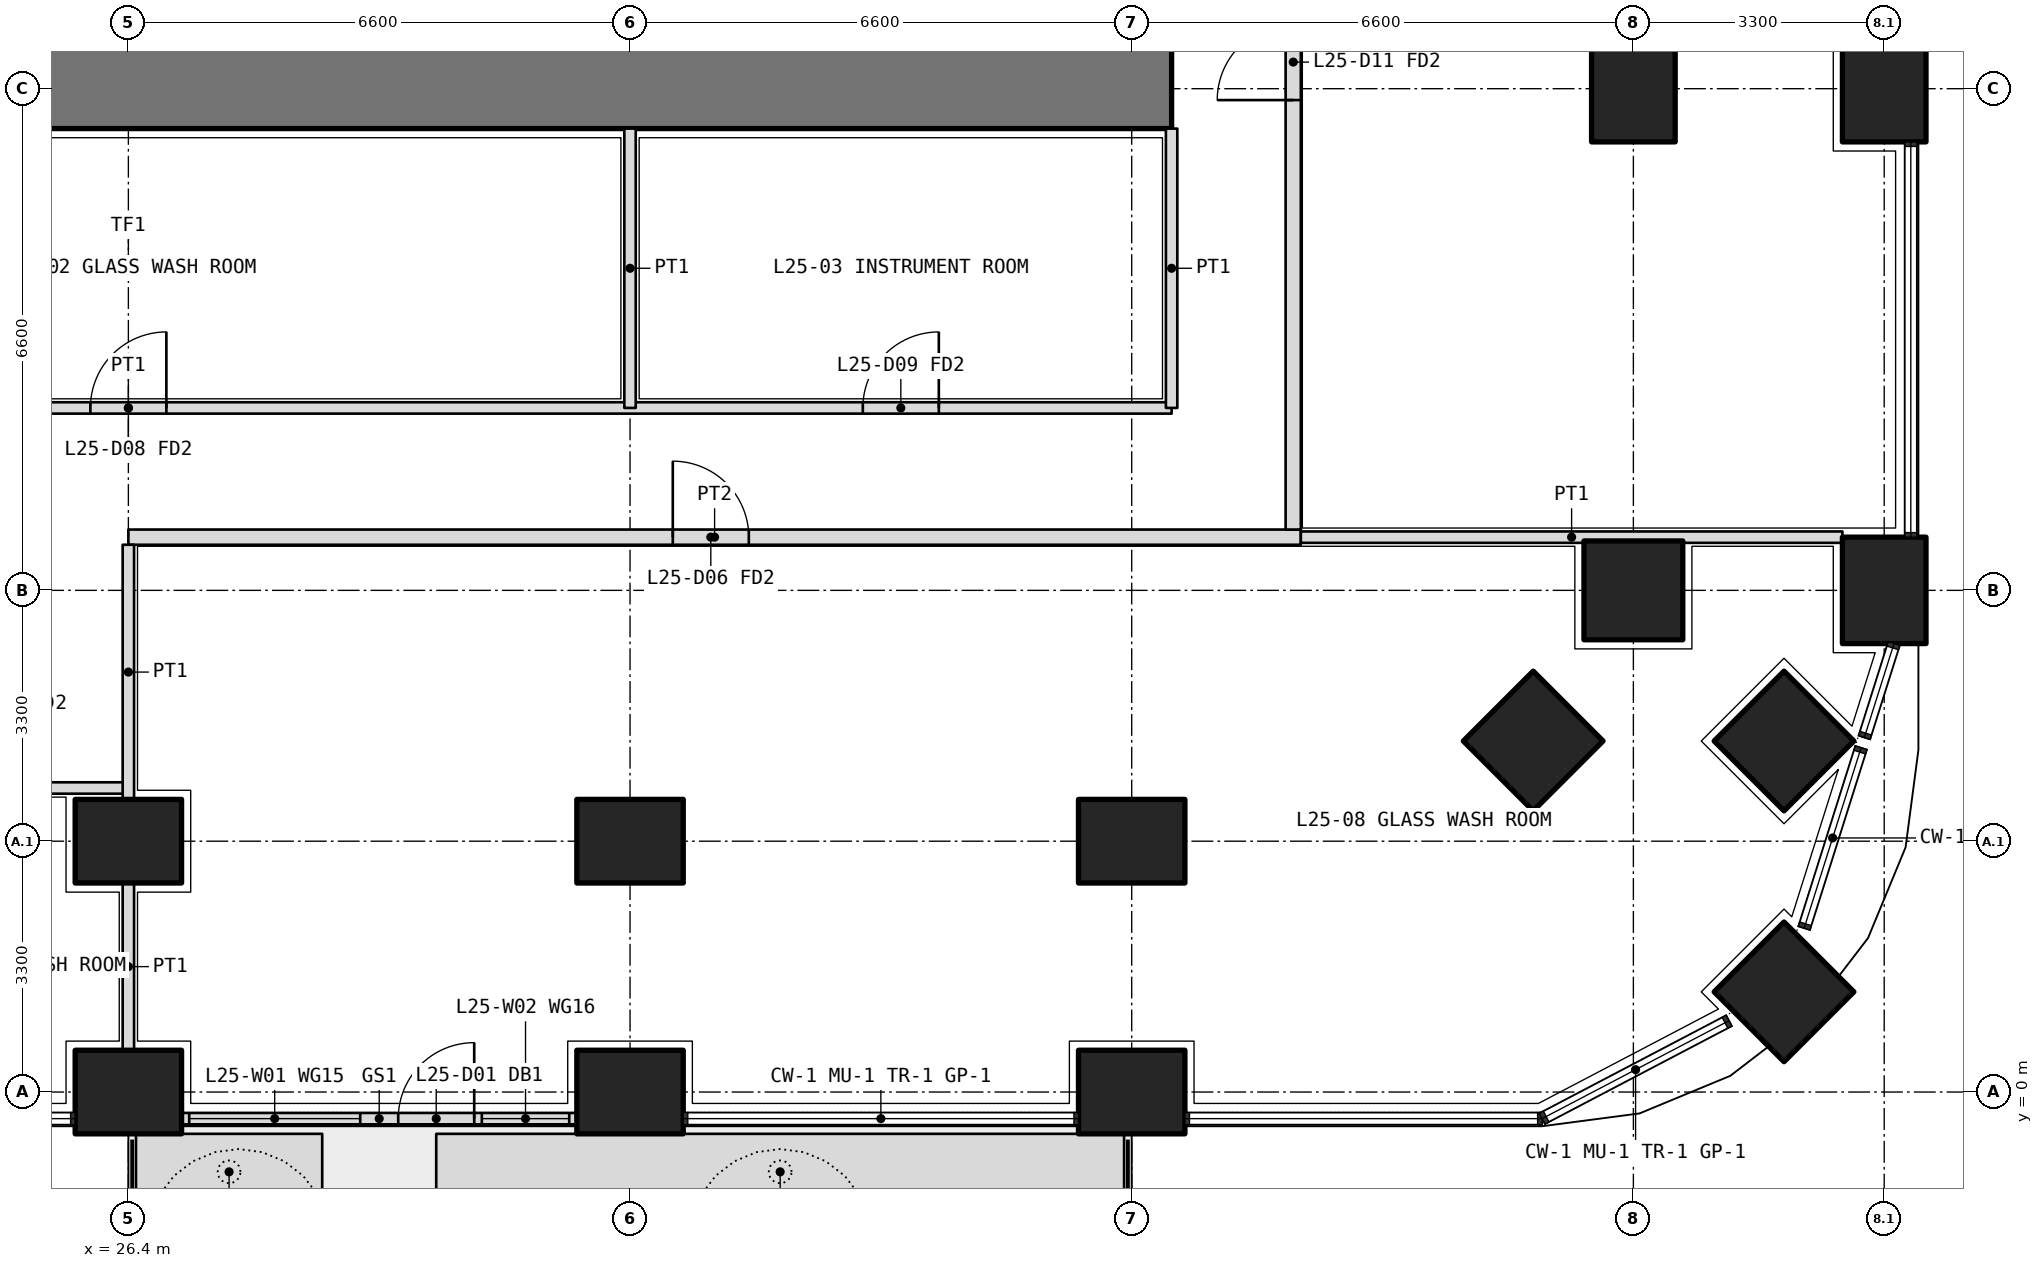
"""IFC4 building model, lengths in metres.
Left out: names, types, materials, properties, quantities, classifications, styles, units other than length and angle.
Written with IfcOpenShell. Run it as: python <this file> out.ifc"""

import sys

from ifc_helpers import new_model, si_unit, direction, frame, frame_2d, origin, origin_2d, place, context, subcontext, project, spatial, polyline, rectangle, outline, extrude, element, fill, save


model = new_model("IFC4")
c1 = context("Model", 3, precision=1e-05, world=origin(), true_north=direction((0.0, 1.0)))
c2 = subcontext(c1, "Body", "Model", "MODEL_VIEW")
j1 = project(units=[si_unit("LENGTHUNIT", "METRE"), si_unit("PLANEANGLEUNIT", "RADIAN")], contexts=[c1])
p1 = place(None, origin())
s1 = spatial("IfcSite", under=j1, at=p1, CompositionType="ELEMENT")
p2 = place(p1, origin())
s2 = spatial("IfcBuilding", under=s1, at=p2, CompositionType="ELEMENT")
p3 = place(p2, frame((0.0, 0.0, 111.6)))
s3 = spatial("IfcBuildingStorey", under=s2, at=p3, CompositionType="ELEMENT", Elevation=111.6)
p4 = place(p3, frame((48.182, 1.318, 0.0), z_axis=(0.0, 0.0, 1.0), x_axis=(0.707106781187, 0.707106781187, 0.0)))
e1 = element("IfcColumn", 1, at=p4, inside=s3, PredefinedType="COLUMN", context=c2, shape_type="SweptSolid", body=[
    extrude(rectangle(XDim=1.3, YDim=1.3, at=origin_2d()), origin(), (0.0, 0.0, 1.0), 4.2),
])
for number, where, z_axis, x_axis in (
    (2, (26.4, 0.0, 0.0), (0.0, 0.0, 1.0), (1.0, 0.0, 0.0)),
    (3, (33.0, 0.0, 0.0), (0.0, 0.0, 1.0), (1.0, 0.0, 0.0)),
    (4, (39.6, 0.0, 0.0), (0.0, 0.0, 1.0), (1.0, 0.0, 0.0)),
    (5, (49.5, 6.6, 0.0), (0.0, 0.0, 1.0), (0.0, 1.0, 0.0)),
    (6, (49.5, 13.2, 0.0), (0.0, 0.0, 1.0), (0.0, 1.0, 0.0)),
):
    element("IfcColumn", number, at=place(p3, frame(where, z_axis=z_axis, x_axis=x_axis)), inside=s3, PredefinedType="COLUMN", context=c2, shape_type="SweptSolid", body=[
        extrude(rectangle(XDim=1.4, YDim=1.1, at=origin_2d()), origin(), (0.0, 0.0, 1.0), 4.2),
    ])
for number, where, z_axis, x_axis in (
    (7, (46.2, 6.6, 0.0), (0.0, 0.0, 1.0), (1.0, 0.0, 0.0)),
    (8, (48.182, 4.618, 0.0), (0.0, 0.0, 1.0), (0.707, 0.707, 0.0)),
):
    element("IfcColumn", number, at=place(p3, frame(where, z_axis=z_axis, x_axis=x_axis)), inside=s3, PredefinedType="COLUMN", context=c2, shape_type="SweptSolid", body=[
        extrude(rectangle(XDim=1.3, YDim=1.3, at=origin_2d()), origin(), (0.0, 0.0, 1.0), 4.2),
    ])
for number, where, z_axis, x_axis in (
    (9, (26.4, 3.3, 0.0), (0.0, 0.0, 1.0), (1.0, 0.0, 0.0)),
    (10, (33.0, 3.3, 0.0), (0.0, 0.0, 1.0), (1.0, 0.0, 0.0)),
    (11, (39.6, 3.3, 0.0), (0.0, 0.0, 1.0), (1.0, 0.0, 0.0)),
):
    element("IfcColumn", number, at=place(p3, frame(where, z_axis=z_axis, x_axis=x_axis)), inside=s3, PredefinedType="COLUMN", context=c2, shape_type="SweptSolid", body=[
        extrude(rectangle(XDim=1.4, YDim=1.1, at=origin_2d()), origin(), (0.0, 0.0, 1.0), 4.2),
    ])
p5 = place(p3, frame((44.882, 4.618, 0.0), z_axis=(0.0, 0.0, 1.0), x_axis=(0.707106781187, 0.707106781187, 0.0)))
e12 = element("IfcColumn", 12, at=p5, inside=s3, PredefinedType="COLUMN", context=c2, shape_type="SweptSolid", body=[
    extrude(rectangle(XDim=1.3, YDim=1.3, at=origin_2d()), origin(), (0.0, 0.0, 1.0), 4.2),
])
p6 = place(p3, frame((46.2, 13.2, 0.0), z_axis=(0.0, 0.0, 1.0), x_axis=(0.0, 1.0, 0.0)))
e13 = element("IfcColumn", 13, at=p6, inside=s3, PredefinedType="COLUMN", context=c2, shape_type="SweptSolid", body=[
    extrude(rectangle(XDim=1.4, YDim=1.1, at=origin_2d()), origin(), (0.0, 0.0, 1.0), 4.2),
])
p7 = place(p3, origin())
e14 = element("IfcWall", 14, at=p7, inside=s3, PredefinedType="USERDEFINED", context=c2, shape_type="SweptSolid", body=[
    extrude(outline(polyline([(26.5, -1.55), (28.95, -1.55), (28.95, -0.55), (26.5, -0.55), (26.5, -1.55)]), holes=[polyline([(26.65, -1.4), (28.8, -1.4), (28.8, -0.7), (26.65, -0.7), (26.65, -1.4)])]), origin(), (0.0, 0.0, 1.0), 1.05),
])
p8 = place(p3, origin())
e15 = element("IfcWall", 15, at=p8, inside=s3, PredefinedType="USERDEFINED", context=c2, shape_type="SweptSolid", body=[
    extrude(outline(polyline([(30.45, -1.55), (39.5, -1.55), (39.5, -0.55), (30.45, -0.55), (30.45, -1.55)]), holes=[polyline([(30.6, -1.4), (39.35, -1.4), (39.35, -0.7), (30.6, -0.7), (30.6, -1.4)])]), origin(), (0.0, 0.0, 1.0), 1.05),
])
p9 = place(p3, frame((27.1, -0.35, 0.0), z_axis=(0.0, 0.0, 1.0), x_axis=(1.0, 0.0, 0.0)))
e16 = element("IfcWall", 16, at=p9, inside=s3, PredefinedType="SOLIDWALL", context=c2, shape_type="SweptSolid", body=[
    extrude(rectangle(XDim=5.2, YDim=0.15, at=frame_2d((2.6, 0.0))), origin(), (0.0, 0.0, 1.0), 2.7),
])
p10 = place(p9, frame((2.85, 0.0, 0.0)))
e17 = element("IfcOpeningElement", 17, at=p10, cuts=e16, PredefinedType="OPENING", context=c2, shape_type="SweptSolid", body=[
    extrude(rectangle(XDim=1.0, YDim=2.4, at=frame_2d((0.5, 1.2))), frame((0.0, 0.085, 0.0), z_axis=(0.0, -1.0, 0.0), x_axis=(1.0, 0.0, 0.0)), (0.0, 0.0, 1.0), 0.17),
])
p11 = place(p9, frame((0.1, 0.0, 0.1)))
e18 = element("IfcOpeningElement", 18, at=p11, cuts=e16, PredefinedType="OPENING", context=c2, shape_type="SweptSolid", body=[
    extrude(rectangle(XDim=2.25, YDim=2.3, at=frame_2d((1.125, 1.15))), frame((0.0, 0.085, 0.0), z_axis=(0.0, -1.0, 0.0), x_axis=(1.0, 0.0, 0.0)), (0.0, 0.0, 1.0), 0.17),
])
p12 = place(p9, frame((3.95, 0.0, 0.1)))
e19 = element("IfcOpeningElement", 19, at=p12, cuts=e16, PredefinedType="OPENING", context=c2, shape_type="SweptSolid", body=[
    extrude(rectangle(XDim=1.15, YDim=2.3, at=frame_2d((0.575, 1.15))), frame((0.0, 0.085, 0.0), z_axis=(0.0, -1.0, 0.0), x_axis=(1.0, 0.0, 0.0)), (0.0, 0.0, 1.0), 0.17),
])
p13 = place(p3, frame((12.675, 13.2, 0.0), z_axis=(0.0, 0.0, 1.0), x_axis=(1.0, 0.0, 0.0)))
e20 = element("IfcWall", 20, at=p13, inside=s3, PredefinedType="SHEAR", context=c2, shape_type="SweptSolid", body=[
    extrude(rectangle(XDim=27.45, YDim=1.05, at=frame_2d((13.725, 0.0))), origin(), (0.0, 0.0, 1.0), 4.2),
])
p14 = place(p3, frame((12.675, 9.0, 0.0), z_axis=(0.0, 0.0, 1.0), x_axis=(1.0, 0.0, 0.0)))
e21 = element("IfcWall", 21, at=p14, inside=s3, PredefinedType="PARTITIONING", context=c2, shape_type="SweptSolid", body=[
    extrude(rectangle(XDim=27.45, YDim=0.15, at=frame_2d((13.725, 0.0))), origin(), (0.0, 0.0, 1.0), 2.85),
])
p15 = place(p14, frame((3.062, 0.0, 0.0)))
e22 = element("IfcOpeningElement", 22, at=p15, cuts=e21, PredefinedType="OPENING", context=c2, shape_type="SweptSolid", body=[
    extrude(rectangle(XDim=1.0, YDim=2.1, at=frame_2d((0.5, 1.05))), frame((0.0, 0.085, 0.0), z_axis=(0.0, -1.0, 0.0), x_axis=(1.0, 0.0, 0.0)), (0.0, 0.0, 1.0), 0.17),
])
p16 = place(p14, frame((13.225, 0.0, 0.0)))
e23 = element("IfcOpeningElement", 23, at=p16, cuts=e21, PredefinedType="OPENING", context=c2, shape_type="SweptSolid", body=[
    extrude(rectangle(XDim=1.0, YDim=2.1, at=frame_2d((0.5, 1.05))), frame((0.0, 0.085, 0.0), z_axis=(0.0, -1.0, 0.0), x_axis=(1.0, 0.0, 0.0)), (0.0, 0.0, 1.0), 0.17),
])
p17 = place(p14, frame((23.387, 0.0, 0.0)))
e24 = element("IfcOpeningElement", 24, at=p17, cuts=e21, PredefinedType="OPENING", context=c2, shape_type="SweptSolid", body=[
    extrude(rectangle(XDim=1.0, YDim=2.1, at=frame_2d((0.5, 1.05))), frame((0.0, 0.085, 0.0), z_axis=(0.0, -1.0, 0.0), x_axis=(1.0, 0.0, 0.0)), (0.0, 0.0, 1.0), 0.17),
])
for number, where, z_axis, x_axis in (
    (25, (40.125, 12.675, 0.0), (0.0, 0.0, 1.0), (0.0, -1.0, 0.0)),
    (26, (33.0, 12.675, 0.0), (0.0, 0.0, 1.0), (0.0, -1.0, 0.0)),
):
    element("IfcWall", number, at=place(p3, frame(where, z_axis=z_axis, x_axis=x_axis)), inside=s3, PredefinedType="PARTITIONING", context=c2, shape_type="SweptSolid", body=[
        extrude(rectangle(XDim=3.675, YDim=0.15, at=frame_2d((1.837, 0.0))), origin(), (0.0, 0.0, 1.0), 2.85),
    ])
p18 = place(p3, frame((26.4, 7.3, 0.0), z_axis=(0.0, 0.0, 1.0), x_axis=(1.0, 0.0, 0.0)))
e27 = element("IfcWall", 27, at=p18, inside=s3, PredefinedType="PARTITIONING", context=c2, shape_type="SweptSolid", body=[
    extrude(rectangle(XDim=15.425, YDim=0.2, at=frame_2d((7.712, 0.0))), origin(), (0.0, 0.0, 1.0), 2.85),
])
p19 = place(p18, frame((7.163, 0.0, 0.0)))
e28 = element("IfcOpeningElement", 28, at=p19, cuts=e27, PredefinedType="OPENING", context=c2, shape_type="SweptSolid", body=[
    extrude(rectangle(XDim=1.0, YDim=2.1, at=frame_2d((0.5, 1.05))), frame((0.0, 0.11, 0.0), z_axis=(0.0, -1.0, 0.0), x_axis=(1.0, 0.0, 0.0)), (0.0, 0.0, 1.0), 0.22),
])
p20 = place(p3, frame((41.725, 7.4, 0.0), z_axis=(0.0, 0.0, 1.0), x_axis=(0.0, 1.0, 0.0)))
e29 = element("IfcWall", 29, at=p20, inside=s3, PredefinedType="PARTITIONING", context=c2, shape_type="SweptSolid", body=[
    extrude(rectangle(XDim=27.625, YDim=0.2, at=frame_2d((13.812, 0.0))), origin(), (0.0, 0.0, 1.0), 2.85),
])
p21 = place(p20, frame((5.65, 0.0, 0.0)))
e30 = element("IfcOpeningElement", 30, at=p21, cuts=e29, PredefinedType="OPENING", context=c2, shape_type="SweptSolid", body=[
    extrude(rectangle(XDim=1.0, YDim=2.1, at=frame_2d((0.5, 1.05))), frame((0.0, 0.11, 0.0), z_axis=(0.0, -1.0, 0.0), x_axis=(1.0, 0.0, 0.0)), (0.0, 0.0, 1.0), 0.22),
])
p22 = place(p20, frame((13.5, 0.0, 0.0)))
e31 = element("IfcOpeningElement", 31, at=p22, cuts=e29, PredefinedType="OPENING", context=c2, shape_type="SweptSolid", body=[
    extrude(rectangle(XDim=1.0, YDim=2.1, at=frame_2d((0.5, 1.05))), frame((0.0, 0.11, 0.0), z_axis=(0.0, -1.0, 0.0), x_axis=(1.0, 0.0, 0.0)), (0.0, 0.0, 1.0), 0.22),
])
p23 = place(p20, frame((16.85, 0.0, 0.0)))
e32 = element("IfcOpeningElement", 32, at=p23, cuts=e29, PredefinedType="OPENING", context=c2, shape_type="SweptSolid", body=[
    extrude(rectangle(XDim=0.9, YDim=2.1, at=frame_2d((0.45, 1.05))), frame((0.0, 0.11, 0.0), z_axis=(0.0, -1.0, 0.0), x_axis=(1.0, 0.0, 0.0)), (0.0, 0.0, 1.0), 0.22),
])
p24 = place(p20, frame((21.8, 0.0, 0.0)))
e33 = element("IfcOpeningElement", 33, at=p24, cuts=e29, PredefinedType="OPENING", context=c2, shape_type="SweptSolid", body=[
    extrude(rectangle(XDim=1.0, YDim=2.1, at=frame_2d((0.5, 1.05))), frame((0.0, 0.11, 0.0), z_axis=(0.0, -1.0, 0.0), x_axis=(1.0, 0.0, 0.0)), (0.0, 0.0, 1.0), 0.22),
])
p25 = place(p20, frame((26.163, 0.0, 0.0)))
e34 = element("IfcOpeningElement", 34, at=p25, cuts=e29, PredefinedType="OPENING", context=c2, shape_type="SweptSolid", body=[
    extrude(rectangle(XDim=1.0, YDim=2.1, at=frame_2d((0.5, 1.05))), frame((0.0, 0.11, 0.0), z_axis=(0.0, -1.0, 0.0), x_axis=(1.0, 0.0, 0.0)), (0.0, 0.0, 1.0), 0.22),
])
p26 = place(p3, frame((48.95, 7.3, 0.0), z_axis=(0.0, 0.0, 1.0), x_axis=(-1.0, 0.0, 0.0)))
e35 = element("IfcWall", 35, at=p26, inside=s3, PredefinedType="PARTITIONING", context=c2, shape_type="SweptSolid", body=[
    extrude(rectangle(XDim=7.125, YDim=0.15, at=frame_2d((3.562, 0.0))), origin(), (0.0, 0.0, 1.0), 2.85),
])
p27 = place(p3, frame((23.1, 4.0, 0.0), z_axis=(0.0, 0.0, 1.0), x_axis=(1.0, 0.0, 0.0)))
e36 = element("IfcWall", 36, at=p27, inside=s3, PredefinedType="PARTITIONING", context=c2, shape_type="SweptSolid", body=[
    extrude(rectangle(XDim=3.3, YDim=0.15, at=frame_2d((1.65, 0.0))), origin(), (0.0, 0.0, 1.0), 2.85),
])
p28 = place(p27, frame((1.15, 0.0, 0.0)))
e37 = element("IfcOpeningElement", 37, at=p28, cuts=e36, PredefinedType="OPENING", context=c2, shape_type="SweptSolid", body=[
    extrude(rectangle(XDim=1.0, YDim=2.1, at=frame_2d((0.5, 1.05))), frame((0.0, 0.085, 0.0), z_axis=(0.0, -1.0, 0.0), x_axis=(1.0, 0.0, 0.0)), (0.0, 0.0, 1.0), 0.17),
])
p29 = place(p3, frame((26.4, 0.55, 0.0), z_axis=(0.0, 0.0, 1.0), x_axis=(0.0, 1.0, 0.0)))
e38 = element("IfcWall", 38, at=p29, inside=s3, PredefinedType="PARTITIONING", context=c2, shape_type="SweptSolid", body=[
    extrude(rectangle(XDim=2.2, YDim=0.15, at=frame_2d((1.1, 0.0))), origin(), (0.0, 0.0, 1.0), 2.85),
])
p30 = place(p3, frame((26.4, 3.85, 0.0), z_axis=(0.0, 0.0, 1.0), x_axis=(0.0, 1.0, 0.0)))
e39 = element("IfcWall", 39, at=p30, inside=s3, PredefinedType="PARTITIONING", context=c2, shape_type="SweptSolid", body=[
    extrude(rectangle(XDim=3.35, YDim=0.15, at=frame_2d((1.675, 0.0))), origin(), (0.0, 0.0, 1.0), 2.85),
])
p31 = place(p10, origin())
e40 = element("IfcDoor", 40, at=p31, inside=s3, OperationType="SINGLE_SWING_RIGHT", PredefinedType="DOOR", context=c2, shape_type="SweptSolid", body=[
    extrude(rectangle(XDim=1.0, YDim=2.4, at=frame_2d((0.5, 1.2))), frame((0.0, 0.025, 0.0), z_axis=(0.0, -1.0, 0.0), x_axis=(1.0, 0.0, 0.0)), (0.0, 0.0, 1.0), 0.05),
])
fill(e17, e40)
p32 = place(p11, origin())
e41 = element("IfcWindow", 41, at=p32, inside=s3, PartitioningType="SINGLE_PANEL", PredefinedType="WINDOW", context=c2, shape_type="SweptSolid", body=[
    extrude(rectangle(XDim=2.25, YDim=2.3, at=frame_2d((1.125, 1.15))), frame((0.0, 0.03, 0.0), z_axis=(0.0, -1.0, 0.0), x_axis=(1.0, 0.0, 0.0)), (0.0, 0.0, 1.0), 0.06),
])
fill(e18, e41)
p33 = place(p12, origin())
e42 = element("IfcWindow", 42, at=p33, inside=s3, PartitioningType="SINGLE_PANEL", PredefinedType="WINDOW", context=c2, shape_type="SweptSolid", body=[
    extrude(rectangle(XDim=1.15, YDim=2.3, at=frame_2d((0.575, 1.15))), frame((0.0, 0.03, 0.0), z_axis=(0.0, -1.0, 0.0), x_axis=(1.0, 0.0, 0.0)), (0.0, 0.0, 1.0), 0.06),
])
fill(e19, e42)
p34 = place(p16, origin())
e43 = element("IfcDoor", 43, at=p34, inside=s3, OperationType="SINGLE_SWING_RIGHT", PredefinedType="DOOR", context=c2, shape_type="SweptSolid", body=[
    extrude(rectangle(XDim=1.0, YDim=2.1, at=frame_2d((0.5, 1.05))), frame((0.0, 0.025, 0.0), z_axis=(0.0, -1.0, 0.0), x_axis=(1.0, 0.0, 0.0)), (0.0, 0.0, 1.0), 0.05),
])
fill(e23, e43)
p35 = place(p17, origin())
e44 = element("IfcDoor", 44, at=p35, inside=s3, OperationType="SINGLE_SWING_RIGHT", PredefinedType="DOOR", context=c2, shape_type="SweptSolid", body=[
    extrude(rectangle(XDim=1.0, YDim=2.1, at=frame_2d((0.5, 1.05))), frame((0.0, 0.025, 0.0), z_axis=(0.0, -1.0, 0.0), x_axis=(1.0, 0.0, 0.0)), (0.0, 0.0, 1.0), 0.05),
])
fill(e24, e44)
p36 = place(p19, origin())
e45 = element("IfcDoor", 45, at=p36, inside=s3, OperationType="SINGLE_SWING_LEFT", PredefinedType="DOOR", context=c2, shape_type="SweptSolid", body=[
    extrude(rectangle(XDim=1.0, YDim=2.1, at=frame_2d((0.5, 1.05))), frame((0.0, 0.025, 0.0), z_axis=(0.0, -1.0, 0.0), x_axis=(1.0, 0.0, 0.0)), (0.0, 0.0, 1.0), 0.05),
])
fill(e28, e45)
p37 = place(p21, origin())
e46 = element("IfcDoor", 46, at=p37, inside=s3, OperationType="SINGLE_SWING_LEFT", PredefinedType="DOOR", context=c2, shape_type="SweptSolid", body=[
    extrude(rectangle(XDim=1.0, YDim=2.1, at=frame_2d((0.5, 1.05))), frame((0.0, 0.025, 0.0), z_axis=(0.0, -1.0, 0.0), x_axis=(1.0, 0.0, 0.0)), (0.0, 0.0, 1.0), 0.05),
])
fill(e30, e46)
save(model, sys.argv[1])
